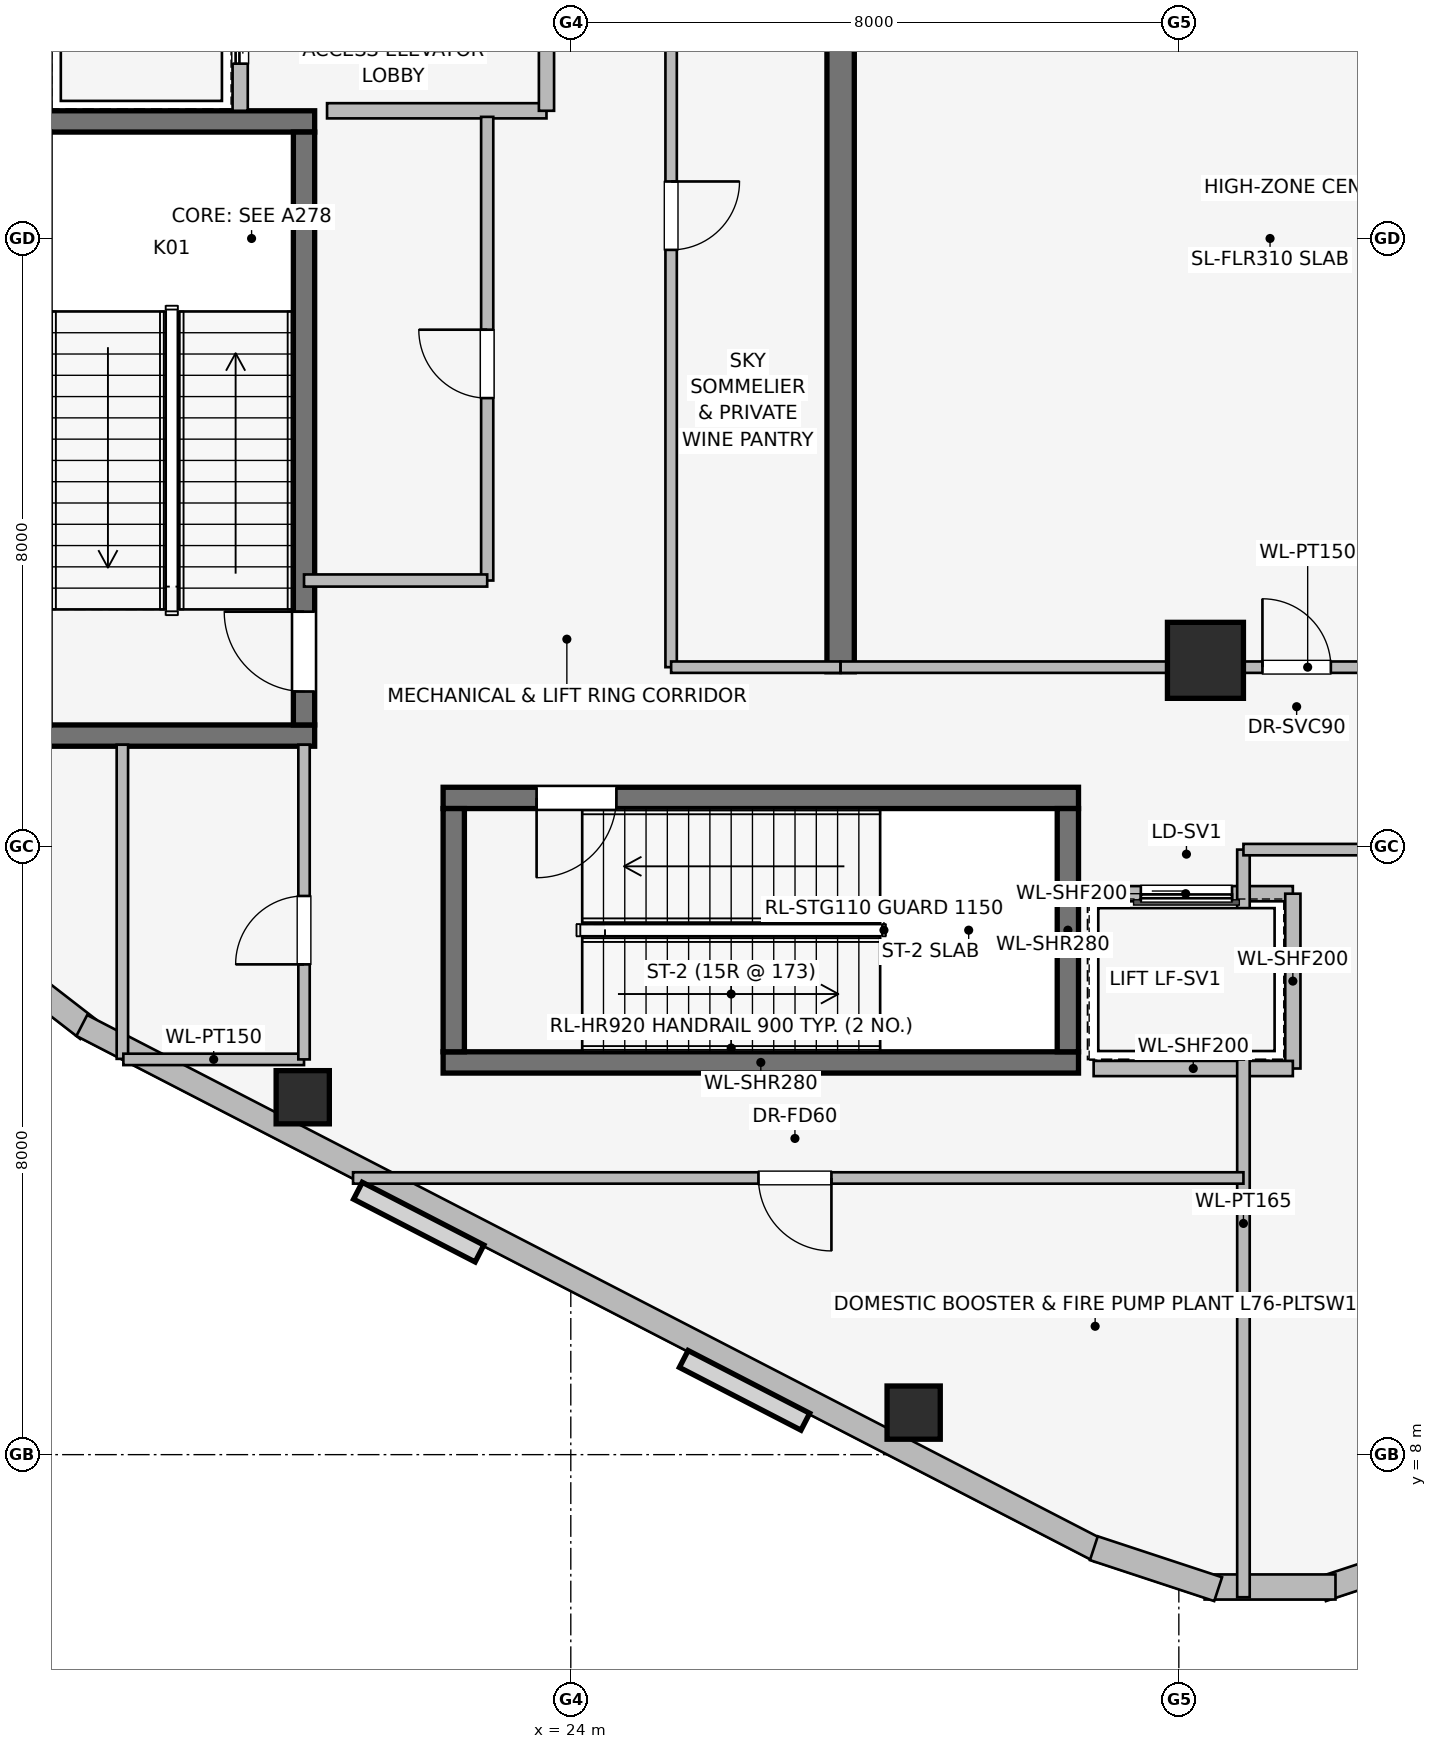
"""IFC4 building model, lengths in metres.
Left out: names, types, materials, properties, quantities, classifications, styles, units other than length and angle.
Written with IfcOpenShell. Run it as: python <this file> out.ifc"""

import sys

from ifc_helpers import new_model, si_unit, direction, frame, frame_2d, origin, origin_2d, place, context, subcontext, project, spatial, rectangle, extrude, element, fill, save


model = new_model("IFC4")
c1 = context("Model", 3, precision=1e-05, world=origin(), true_north=direction((0.0, 1.0)))
c2 = subcontext(c1, "Body", "Model", "MODEL_VIEW")
j1 = project(units=[si_unit("LENGTHUNIT", "METRE"), si_unit("PLANEANGLEUNIT", "RADIAN")], contexts=[c1])
p1 = place(None, origin())
s1 = spatial("IfcSite", under=j1, at=p1, CompositionType="ELEMENT")
p2 = place(p1, origin())
s2 = spatial("IfcBuilding", under=s1, at=p2, CompositionType="ELEMENT")
p3 = place(p2, frame((0.0, 0.0, 279.9)))
s3 = spatial("IfcBuildingStorey", under=s2, at=p3, CompositionType="ELEMENT", Elevation=279.9)
p4 = place(p3, frame((27.55, 29.55, 0.0), z_axis=(0.0, 0.0, 1.0), x_axis=(0.0, -1.0, 0.0)))
e1 = element("IfcWall", 1, at=p4, inside=s3, PredefinedType="SHEAR", context=c2, shape_type="SweptSolid", body=[
    extrude(rectangle(XDim=11.25, YDim=0.36, at=frame_2d((5.625, 0.0))), origin(), (0.0, 0.0, 1.0), 5.2),
])
for number, where, z_axis, x_axis in (
    (2, (16.87, 17.46, 0.0), (0.0, 0.0, 1.0), (1.0, 0.0, 0.0)),
    (3, (20.63, 25.54, 0.0), (0.0, 0.0, 1.0), (-1.0, 0.0, 0.0)),
):
    element("IfcWall", number, at=place(p3, frame(where, z_axis=z_axis, x_axis=x_axis)), inside=s3, PredefinedType="SHEAR", context=c2, shape_type="SweptSolid", body=[
        extrude(rectangle(XDim=3.76, YDim=0.28, at=frame_2d((1.88, 0.0))), origin(), (0.0, 0.0, 1.0), 5.2),
    ])
p5 = place(p3, frame((20.49, 17.6, 0.0), z_axis=(0.0, 0.0, 1.0), x_axis=(0.0, 1.0, 0.0)))
e4 = element("IfcWall", 4, at=p5, inside=s3, PredefinedType="SHEAR", context=c2, shape_type="SweptSolid", body=[
    extrude(rectangle(XDim=7.8, YDim=0.28, at=frame_2d((3.9, 0.0))), origin(), (0.0, 0.0, 1.0), 5.2),
])
p6 = place(p5, frame((0.44, 0.0, 0.0)))
e5 = element("IfcOpeningElement", 5, at=p6, cuts=e4, PredefinedType="OPENING", context=c2, shape_type="SweptSolid", body=[
    extrude(rectangle(XDim=1.05, YDim=2.0, at=frame_2d((0.525, 1.0))), frame((0.0, 0.15, 0.0), z_axis=(0.0, -1.0, 0.0), x_axis=(1.0, 0.0, 0.0)), (0.0, 0.0, 1.0), 0.3),
])
p7 = place(p3, frame((22.32, 13.16, 0.0), z_axis=(0.0, 0.0, 1.0), x_axis=(1.0, 0.0, 0.0)))
e6 = element("IfcWall", 6, at=p7, inside=s3, PredefinedType="SHEAR", context=c2, shape_type="SweptSolid", body=[
    extrude(rectangle(XDim=8.36, YDim=0.28, at=frame_2d((4.18, 0.0))), origin(), (0.0, 0.0, 1.0), 5.2),
])
p8 = place(p3, frame((30.68, 16.64, 0.0), z_axis=(0.0, 0.0, 1.0), x_axis=(-1.0, 0.0, 0.0)))
e7 = element("IfcWall", 7, at=p8, inside=s3, PredefinedType="SHEAR", context=c2, shape_type="SweptSolid", body=[
    extrude(rectangle(XDim=8.36, YDim=0.28, at=frame_2d((4.18, 0.0))), origin(), (0.0, 0.0, 1.0), 5.2),
])
p9 = place(p8, frame((6.08, 0.0, 0.0)))
e8 = element("IfcOpeningElement", 8, at=p9, cuts=e7, PredefinedType="OPENING", context=c2, shape_type="SweptSolid", body=[
    extrude(rectangle(XDim=1.05, YDim=2.0, at=frame_2d((0.525, 1.0))), frame((0.0, 0.15, 0.0), z_axis=(0.0, -1.0, 0.0), x_axis=(1.0, 0.0, 0.0)), (0.0, 0.0, 1.0), 0.3),
])
for number, where, z_axis, x_axis in (
    (9, (22.46, 16.5, 0.0), (0.0, 0.0, 1.0), (0.0, -1.0, 0.0)),
    (10, (30.54, 13.3, 0.0), (0.0, 0.0, 1.0), (0.0, 1.0, 0.0)),
):
    element("IfcWall", number, at=place(p3, frame(where, z_axis=z_axis, x_axis=x_axis)), inside=s3, PredefinedType="SHEAR", context=c2, shape_type="SweptSolid", body=[
        extrude(rectangle(XDim=3.2, YDim=0.28, at=frame_2d((1.6, 0.0))), origin(), (0.0, 0.0, 1.0), 5.2),
    ])
p10 = place(p3, frame((32.35, 18.45, 0.0), z_axis=(0.0, 0.0, 1.0), x_axis=(1.0, 0.0, 0.0)))
e11 = element("IfcColumn", 11, at=p10, inside=s3, PredefinedType="COLUMN", context=c2, shape_type="SweptSolid", body=[
    extrude(rectangle(XDim=1.0, YDim=1.0, at=origin_2d()), origin(), (0.0, 0.0, 1.0), 5.2),
])
for number, where, z_axis, x_axis in (
    (12, (20.473, 12.702, 0.0), (0.0, 0.0, 1.0), (1.0, 0.0, 0.0)),
    (13, (28.511, 8.553, 0.0), (0.0, 0.0, 1.0), (1.0, 0.0, 0.0)),
):
    element("IfcColumn", number, at=place(p3, frame(where, z_axis=z_axis, x_axis=x_axis)), inside=s3, PredefinedType="COLUMN", context=c2, shape_type="SweptSolid", body=[
        extrude(rectangle(XDim=0.7, YDim=0.7, at=origin_2d()), origin(), (0.0, 0.0, 1.0), 5.2),
    ])
p11 = place(p3, frame((17.647, 13.599, 0.0), z_axis=(0.0, 0.0, 1.0), x_axis=(-0.790691856293, 0.61221433207, 0.0)))
e14 = element("IfcWall", 14, at=p11, inside=s3, PredefinedType="STANDARD", context=c2, shape_type="SweptSolid", body=[
    extrude(rectangle(XDim=1.676, YDim=0.33, at=frame_2d((0.838, 0.0))), origin(), (0.0, 0.0, 1.0), 4.89),
])
p12 = place(p3, frame((30.963, 6.73, 0.0), z_axis=(0.0, 0.0, 1.0), x_axis=(-0.888581481622, 0.458718814218, 0.0)))
e15 = element("IfcWall", 15, at=p12, inside=s3, PredefinedType="STANDARD", context=c2, shape_type="SweptSolid", body=[
    extrude(rectangle(XDim=15.077, YDim=0.31, at=frame_2d((7.539, 0.0))), origin(), (0.0, 0.0, 1.0), 4.89),
])
p13 = place(p3, frame((35.518, 6.769, 0.0), z_axis=(0.0, 0.0, 1.0), x_axis=(-0.949713440491, -0.313120393699, 0.0)))
e16 = element("IfcWall", 16, at=p13, inside=s3, PredefinedType="STANDARD", context=c2, shape_type="SweptSolid", body=[
    extrude(rectangle(XDim=1.722, YDim=0.33, at=frame_2d((0.861, 0.0))), origin(), (0.0, 0.0, 1.0), 4.89),
])
p14 = place(p3, frame((34.061, 6.259, 0.0), z_axis=(0.0, 0.0, 1.0), x_axis=(-1.0, 0.0, 0.0)))
e17 = element("IfcWall", 17, at=p14, inside=s3, PredefinedType="STANDARD", context=c2, shape_type="SweptSolid", body=[
    extrude(rectangle(XDim=1.722, YDim=0.33, at=frame_2d((0.861, 0.0))), origin(), (0.0, 0.0, 1.0), 4.89),
])
p15 = place(p3, frame((32.517, 6.23, 0.0), z_axis=(0.0, 0.0, 1.0), x_axis=(-0.949713440491, 0.313120393699, 0.0)))
e18 = element("IfcWall", 18, at=p15, inside=s3, PredefinedType="STANDARD", context=c2, shape_type="SweptSolid", body=[
    extrude(rectangle(XDim=1.722, YDim=0.33, at=frame_2d((0.861, 0.0))), origin(), (0.0, 0.0, 1.0), 4.89),
])
p16 = place(p3, frame((19.65, 25.68, 0.0), z_axis=(0.0, 0.0, 1.0), x_axis=(0.0, 1.0, 0.0)))
e19 = element("IfcWall", 19, at=p16, inside=s3, PredefinedType="PARTITIONING", context=c2, shape_type="SweptSolid", body=[
    extrude(rectangle(XDim=5.54, YDim=0.2, at=frame_2d((2.77, 0.0))), origin(), (0.0, 0.0, 1.0), 4.89),
])
p17 = place(p16, frame((0.62, 0.0, 0.0)))
e20 = element("IfcOpeningElement", 20, at=p17, cuts=e19, PredefinedType="OPENING", context=c2, shape_type="SweptSolid", body=[
    extrude(rectangle(XDim=1.1, YDim=2.2, at=frame_2d((0.55, 1.1))), frame((0.0, 0.11, 0.0), z_axis=(0.0, -1.0, 0.0), x_axis=(1.0, 0.0, 0.0)), (0.0, 0.0, 1.0), 0.22),
])
p18 = place(p16, frame((3.12, 0.0, 0.0)))
e21 = element("IfcOpeningElement", 21, at=p18, cuts=e19, PredefinedType="OPENING", context=c2, shape_type="SweptSolid", body=[
    extrude(rectangle(XDim=1.1, YDim=2.2, at=frame_2d((0.55, 1.1))), frame((0.0, 0.11, 0.0), z_axis=(0.0, -1.0, 0.0), x_axis=(1.0, 0.0, 0.0)), (0.0, 0.0, 1.0), 0.22),
])
p19 = place(p3, frame((20.793, 25.68, 0.0), z_axis=(0.0, 0.0, 1.0), x_axis=(1.0, 0.0, 0.0)))
e22 = element("IfcWall", 22, at=p19, inside=s3, PredefinedType="PARTITIONING", context=c2, shape_type="SweptSolid", body=[
    extrude(rectangle(XDim=2.887, YDim=0.2, at=frame_2d((1.443, 0.0))), origin(), (0.0, 0.0, 1.0), 4.89),
])
p20 = place(p3, frame((23.68, 25.68, 0.0), z_axis=(0.0, 0.0, 1.0), x_axis=(0.0, 1.0, 0.0)))
e23 = element("IfcWall", 23, at=p20, inside=s3, PredefinedType="PARTITIONING", context=c2, shape_type="SweptSolid", body=[
    extrude(rectangle(XDim=5.54, YDim=0.2, at=frame_2d((2.77, 0.0))), origin(), (0.0, 0.0, 1.0), 4.89),
])
p21 = place(p20, frame((1.8, 0.0, 0.0)))
e24 = element("IfcOpeningElement", 24, at=p21, cuts=e23, PredefinedType="OPENING", context=c2, shape_type="SweptSolid", body=[
    extrude(rectangle(XDim=1.05, YDim=2.0, at=frame_2d((0.525, 1.0))), frame((0.0, 0.11, 0.0), z_axis=(0.0, -1.0, 0.0), x_axis=(1.0, 0.0, 0.0)), (0.0, 0.0, 1.0), 0.22),
])
p22 = place(p3, frame((33.5, 15.38, 0.0), z_axis=(0.0, 0.0, 1.0), x_axis=(-1.0, 0.0, 0.0)))
e25 = element("IfcWall", 25, at=p22, inside=s3, PredefinedType="PARTITIONING", context=c2, shape_type="SweptSolid", body=[
    extrude(rectangle(XDim=2.82, YDim=0.2, at=frame_2d((1.41, 0.0))), origin(), (0.0, 0.0, 1.0), 4.89),
])
p23 = place(p22, frame((0.8, 0.0, 0.0)))
e26 = element("IfcOpeningElement", 26, at=p23, cuts=e25, PredefinedType="OPENING", context=c2, shape_type="SweptSolid", body=[
    extrude(rectangle(XDim=1.2, YDim=2.2, at=frame_2d((0.6, 1.1))), frame((0.0, 0.11, 0.0), z_axis=(0.0, -1.0, 0.0), x_axis=(1.0, 0.0, 0.0)), (0.0, 0.0, 1.0), 0.22),
])
p24 = place(p3, frame((33.5, 13.08, 0.0), z_axis=(0.0, 0.0, 1.0), x_axis=(0.0, 1.0, 0.0)))
e27 = element("IfcWall", 27, at=p24, inside=s3, PredefinedType="PARTITIONING", context=c2, shape_type="SweptSolid", body=[
    extrude(rectangle(XDim=2.3, YDim=0.2, at=frame_2d((1.15, 0.0))), origin(), (0.0, 0.0, 1.0), 4.89),
])
p25 = place(p3, frame((30.879, 13.08, 0.0), z_axis=(0.0, 0.0, 1.0), x_axis=(1.0, 0.0, 0.0)))
e28 = element("IfcWall", 28, at=p25, inside=s3, PredefinedType="PARTITIONING", context=c2, shape_type="SweptSolid", body=[
    extrude(rectangle(XDim=2.621, YDim=0.2, at=frame_2d((1.311, 0.0))), origin(), (0.0, 0.0, 1.0), 4.89),
])
p26 = place(p3, frame((22.9, 19.5, 0.0), z_axis=(0.0, 0.0, 1.0), x_axis=(0.0, 1.0, 0.0)))
e29 = element("IfcWall", 29, at=p26, inside=s3, PredefinedType="PARTITIONING", context=c2, shape_type="SweptSolid", body=[
    extrude(rectangle(XDim=6.1, YDim=0.16, at=frame_2d((3.05, 0.0))), origin(), (0.0, 0.0, 1.0), 4.89),
])
p27 = place(p26, frame((2.4, 0.0, 0.0)))
e30 = element("IfcOpeningElement", 30, at=p27, cuts=e29, PredefinedType="OPENING", context=c2, shape_type="SweptSolid", body=[
    extrude(rectangle(XDim=0.9, YDim=2.0, at=frame_2d((0.45, 1.0))), frame((0.0, 0.09, 0.0), z_axis=(0.0, -1.0, 0.0), x_axis=(1.0, 0.0, 0.0)), (0.0, 0.0, 1.0), 0.18),
])
p28 = place(p3, frame((20.49, 19.5, 0.0), z_axis=(0.0, 0.0, 1.0), x_axis=(1.0, 0.0, 0.0)))
e31 = element("IfcWall", 31, at=p28, inside=s3, PredefinedType="PARTITIONING", context=c2, shape_type="SweptSolid", body=[
    extrude(rectangle(XDim=2.41, YDim=0.16, at=frame_2d((1.205, 0.0))), origin(), (0.0, 0.0, 1.0), 3.79),
])
p29 = place(p3, frame((25.32, 29.55, 0.0), z_axis=(0.0, 0.0, 1.0), x_axis=(0.0, -1.0, 0.0)))
e32 = element("IfcWall", 32, at=p29, inside=s3, PredefinedType="PARTITIONING", context=c2, shape_type="SweptSolid", body=[
    extrude(rectangle(XDim=11.19, YDim=0.15, at=frame_2d((5.595, 0.0))), origin(), (0.0, 0.0, 1.0), 4.89),
])
p30 = place(p29, frame((4.8, 0.0, 0.0)))
e33 = element("IfcOpeningElement", 33, at=p30, cuts=e32, PredefinedType="OPENING", context=c2, shape_type="SweptSolid", body=[
    extrude(rectangle(XDim=0.9, YDim=2.0, at=frame_2d((0.45, 1.0))), frame((0.0, 0.085, 0.0), z_axis=(0.0, -1.0, 0.0), x_axis=(1.0, 0.0, 0.0)), (0.0, 0.0, 1.0), 0.17),
])
p31 = place(p3, frame((25.32, 18.36, 0.0), z_axis=(0.0, 0.0, 1.0), x_axis=(1.0, 0.0, 0.0)))
e34 = element("IfcWall", 34, at=p31, inside=s3, PredefinedType="PARTITIONING", context=c2, shape_type="SweptSolid", body=[
    extrude(rectangle(XDim=2.23, YDim=0.15, at=frame_2d((1.115, 0.0))), origin(), (0.0, 0.0, 1.0), 4.89),
])
p32 = place(p3, frame((18.1, 17.34, 0.0), z_axis=(0.0, 0.0, 1.0), x_axis=(0.0, -1.0, 0.0)))
e35 = element("IfcWall", 35, at=p32, inside=s3, PredefinedType="PARTITIONING", context=c2, shape_type="SweptSolid", body=[
    extrude(rectangle(XDim=4.133, YDim=0.15, at=frame_2d((2.066, 0.0))), origin(), (0.0, 0.0, 1.0), 4.89),
])
p33 = place(p3, frame((18.113, 13.2, 0.0), z_axis=(0.0, 0.0, 1.0), x_axis=(1.0, 0.0, 0.0)))
e36 = element("IfcWall", 36, at=p33, inside=s3, PredefinedType="PARTITIONING", context=c2, shape_type="SweptSolid", body=[
    extrude(rectangle(XDim=2.377, YDim=0.15, at=frame_2d((1.188, 0.0))), origin(), (0.0, 0.0, 1.0), 4.89),
])
p34 = place(p3, frame((20.49, 13.2, 0.0), z_axis=(0.0, 0.0, 1.0), x_axis=(0.0, 1.0, 0.0)))
e37 = element("IfcWall", 37, at=p34, inside=s3, PredefinedType="PARTITIONING", context=c2, shape_type="SweptSolid", body=[
    extrude(rectangle(XDim=4.14, YDim=0.15, at=frame_2d((2.07, 0.0))), origin(), (0.0, 0.0, 1.0), 4.89),
])
p35 = place(p34, frame((1.25, 0.0, 0.0)))
e38 = element("IfcOpeningElement", 38, at=p35, cuts=e37, PredefinedType="OPENING", context=c2, shape_type="SweptSolid", body=[
    extrude(rectangle(XDim=0.9, YDim=2.0, at=frame_2d((0.45, 1.0))), frame((0.0, 0.085, 0.0), z_axis=(0.0, -1.0, 0.0), x_axis=(1.0, 0.0, 0.0)), (0.0, 0.0, 1.0), 0.17),
])
p36 = place(p3, frame((27.55, 18.36, 0.0), z_axis=(0.0, 0.0, 1.0), x_axis=(1.0, 0.0, 0.0)))
e39 = element("IfcWall", 39, at=p36, inside=s3, PredefinedType="PARTITIONING", context=c2, shape_type="SweptSolid", body=[
    extrude(rectangle(XDim=12.29, YDim=0.15, at=frame_2d((6.145, 0.0))), origin(), (0.0, 0.0, 1.0), 4.031),
])
p37 = place(p36, frame((5.55, 0.0, 0.0)))
e40 = element("IfcOpeningElement", 40, at=p37, cuts=e39, PredefinedType="OPENING", context=c2, shape_type="SweptSolid", body=[
    extrude(rectangle(XDim=0.9, YDim=2.0, at=frame_2d((0.45, 1.0))), frame((0.0, 0.085, 0.0), z_axis=(0.0, -1.0, 0.0), x_axis=(1.0, 0.0, 0.0)), (0.0, 0.0, 1.0), 0.17),
])
p38 = place(p3, frame((32.85, 6.124, 0.0), z_axis=(0.0, 0.0, 1.0), x_axis=(0.0, 1.0, 0.0)))
e41 = element("IfcWall", 41, at=p38, inside=s3, PredefinedType="PARTITIONING", context=c2, shape_type="SweptSolid", body=[
    extrude(rectangle(XDim=9.836, YDim=0.165, at=frame_2d((4.918, 0.0))), origin(), (0.0, 0.0, 1.0), 4.89),
])
p39 = place(p3, frame((32.85, 11.64, 0.0), z_axis=(0.0, 0.0, 1.0), x_axis=(-1.0, 0.0, 0.0)))
e42 = element("IfcWall", 42, at=p39, inside=s3, PredefinedType="PARTITIONING", context=c2, shape_type="SweptSolid", body=[
    extrude(rectangle(XDim=11.715, YDim=0.15, at=frame_2d((5.857, 0.0))), origin(), (0.0, 0.0, 1.0), 4.89),
])
p40 = place(p39, frame((5.421, 0.0, 0.0)))
e43 = element("IfcOpeningElement", 43, at=p40, cuts=e42, PredefinedType="OPENING", context=c2, shape_type="SweptSolid", body=[
    extrude(rectangle(XDim=0.96, YDim=2.0, at=frame_2d((0.48, 1.0))), frame((0.0, 0.085, 0.0), z_axis=(0.0, -1.0, 0.0), x_axis=(1.0, 0.0, 0.0)), (0.0, 0.0, 1.0), 0.17),
])
p41 = place(p3, frame((32.85, 15.96, 0.0), z_axis=(0.0, 0.0, 1.0), x_axis=(1.0, 0.0, 0.0)))
e44 = element("IfcWall", 44, at=p41, inside=s3, PredefinedType="PARTITIONING", context=c2, shape_type="SweptSolid", body=[
    extrude(rectangle(XDim=18.107, YDim=0.15, at=frame_2d((9.053, 0.0))), origin(), (0.0, 0.0, 1.0), 4.433),
])
p42 = place(p41, frame((8.693, 0.0, 0.0)))
e45 = element("IfcOpeningElement", 45, at=p42, cuts=e44, PredefinedType="OPENING", context=c2, shape_type="SweptSolid", body=[
    extrude(rectangle(XDim=0.96, YDim=2.0, at=frame_2d((0.48, 1.0))), frame((0.0, 0.085, 0.0), z_axis=(0.0, -1.0, 0.0), x_axis=(1.0, 0.0, 0.0)), (0.0, 0.0, 1.0), 0.17),
])
p43 = place(p6, origin())
e46 = element("IfcDoor", 46, at=p43, inside=s3, OperationType="SINGLE_SWING_RIGHT", PredefinedType="DOOR", context=c2, shape_type="SweptSolid", body=[
    extrude(rectangle(XDim=1.05, YDim=2.0, at=frame_2d((0.525, 1.0))), frame((0.0, 0.025, 0.0), z_axis=(0.0, -1.0, 0.0), x_axis=(1.0, 0.0, 0.0)), (0.0, 0.0, 1.0), 0.05),
])
fill(e5, e46)
p44 = place(p9, origin())
e47 = element("IfcDoor", 47, at=p44, inside=s3, OperationType="SINGLE_SWING_RIGHT", PredefinedType="DOOR", context=c2, shape_type="SweptSolid", body=[
    extrude(rectangle(XDim=1.05, YDim=2.0, at=frame_2d((0.525, 1.0))), frame((0.0, 0.025, 0.0), z_axis=(0.0, -1.0, 0.0), x_axis=(1.0, 0.0, 0.0)), (0.0, 0.0, 1.0), 0.05),
])
fill(e8, e47)
p45 = place(p17, origin())
e48 = element("IfcDoor", 48, at=p45, inside=s3, OperationType="SLIDING_TO_LEFT", PredefinedType="DOOR", context=c2, shape_type="SweptSolid", body=[
    extrude(rectangle(XDim=1.1, YDim=2.2, at=frame_2d((0.55, 1.1))), frame((0.0, 0.025, 0.0), z_axis=(0.0, -1.0, 0.0), x_axis=(1.0, 0.0, 0.0)), (0.0, 0.0, 1.0), 0.05),
])
fill(e20, e48)
p46 = place(p23, origin())
e49 = element("IfcDoor", 49, at=p46, inside=s3, OperationType="SLIDING_TO_RIGHT", PredefinedType="DOOR", context=c2, shape_type="SweptSolid", body=[
    extrude(rectangle(XDim=1.2, YDim=2.2, at=frame_2d((0.6, 1.1))), frame((0.0, 0.025, 0.0), z_axis=(0.0, -1.0, 0.0), x_axis=(1.0, 0.0, 0.0)), (0.0, 0.0, 1.0), 0.05),
])
fill(e26, e49)
p47 = place(p27, origin())
e50 = element("IfcDoor", 50, at=p47, inside=s3, OperationType="SINGLE_SWING_RIGHT", PredefinedType="DOOR", context=c2, shape_type="SweptSolid", body=[
    extrude(rectangle(XDim=0.9, YDim=2.0, at=frame_2d((0.45, 1.0))), frame((0.0, 0.025, 0.0), z_axis=(0.0, -1.0, 0.0), x_axis=(1.0, 0.0, 0.0)), (0.0, 0.0, 1.0), 0.05),
])
fill(e30, e50)
p48 = place(p30, origin())
e51 = element("IfcDoor", 51, at=p48, inside=s3, OperationType="SINGLE_SWING_LEFT", PredefinedType="DOOR", context=c2, shape_type="SweptSolid", body=[
    extrude(rectangle(XDim=0.9, YDim=2.0, at=frame_2d((0.45, 1.0))), frame((0.0, 0.025, 0.0), z_axis=(0.0, -1.0, 0.0), x_axis=(1.0, 0.0, 0.0)), (0.0, 0.0, 1.0), 0.05),
])
fill(e33, e51)
p49 = place(p35, origin())
e52 = element("IfcDoor", 52, at=p49, inside=s3, OperationType="SINGLE_SWING_LEFT", PredefinedType="DOOR", context=c2, shape_type="SweptSolid", body=[
    extrude(rectangle(XDim=0.9, YDim=2.0, at=frame_2d((0.45, 1.0))), frame((0.0, 0.025, 0.0), z_axis=(0.0, -1.0, 0.0), x_axis=(1.0, 0.0, 0.0)), (0.0, 0.0, 1.0), 0.05),
])
fill(e38, e52)
p50 = place(p37, origin())
e53 = element("IfcDoor", 53, at=p50, inside=s3, OperationType="SINGLE_SWING_LEFT", PredefinedType="DOOR", context=c2, shape_type="SweptSolid", body=[
    extrude(rectangle(XDim=0.9, YDim=2.0, at=frame_2d((0.45, 1.0))), frame((0.0, 0.025, 0.0), z_axis=(0.0, -1.0, 0.0), x_axis=(1.0, 0.0, 0.0)), (0.0, 0.0, 1.0), 0.05),
])
fill(e40, e53)
p51 = place(p40, origin())
e54 = element("IfcDoor", 54, at=p51, inside=s3, OperationType="SINGLE_SWING_LEFT", PredefinedType="DOOR", context=c2, shape_type="SweptSolid", body=[
    extrude(rectangle(XDim=0.96, YDim=2.0, at=frame_2d((0.48, 1.0))), frame((0.0, 0.025, 0.0), z_axis=(0.0, -1.0, 0.0), x_axis=(1.0, 0.0, 0.0)), (0.0, 0.0, 1.0), 0.05),
])
fill(e43, e54)
save(model, sys.argv[1])
